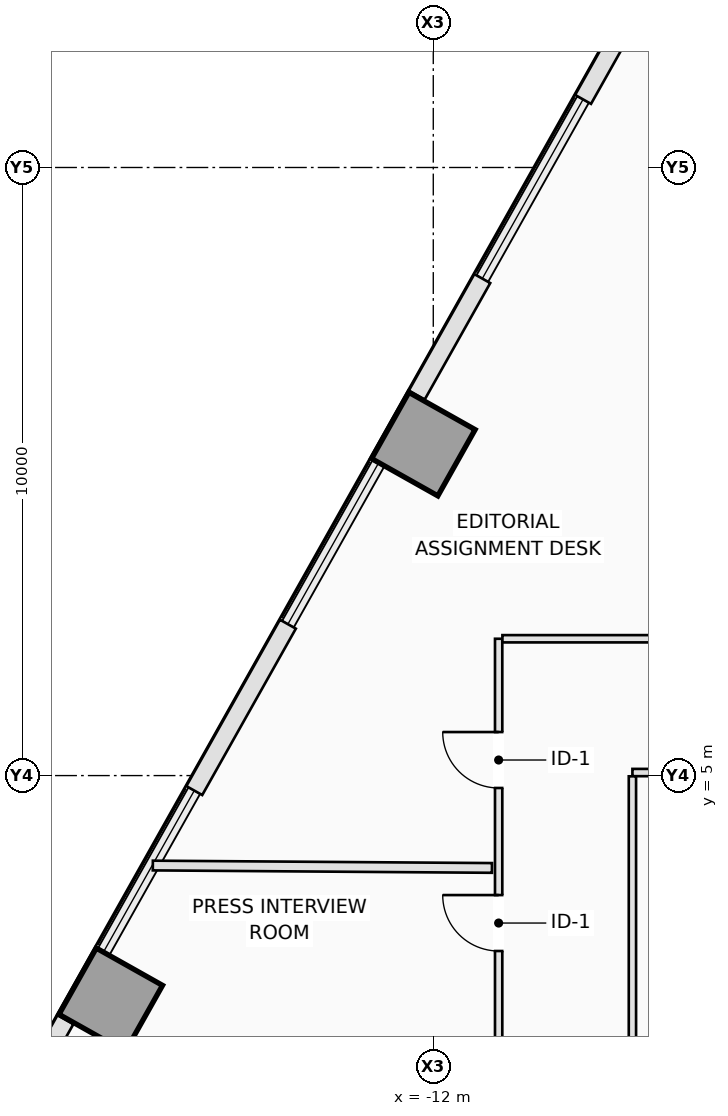
"""IFC4 building model, lengths in metres.
Left out: names, types, materials, properties, quantities, classifications, styles, units other than length and angle.
Written with IfcOpenShell. Run it as: python <this file> out.ifc"""

import sys

from ifc_helpers import new_model, si_unit, direction, frame, frame_2d, origin, origin_2d, place, context, subcontext, project, spatial, rectangle, extrude, element, fill, save


model = new_model("IFC4")
c1 = context("Model", 3, precision=1e-05, world=origin(), true_north=direction((0.0, 1.0)))
c2 = subcontext(c1, "Body", "Model", "MODEL_VIEW")
j1 = project(units=[si_unit("LENGTHUNIT", "METRE"), si_unit("PLANEANGLEUNIT", "RADIAN")], contexts=[c1])
p1 = place(None, origin())
s1 = spatial("IfcSite", under=j1, at=p1, CompositionType="ELEMENT")
p2 = place(p1, origin())
s2 = spatial("IfcBuilding", under=s1, at=p2, CompositionType="ELEMENT")
p3 = place(p2, frame((0.0, 0.0, 41.6)))
s3 = spatial("IfcBuildingStorey", under=s2, at=p3, CompositionType="ELEMENT", Elevation=41.6)
for number, where, z_axis, x_axis in (
    (1, (-12.163, 10.451, 0.0), (0.0, 0.0, 1.0), (-0.872, 0.49, 0.0)),
    (2, (-17.304, 1.312, 0.0), (0.0, 0.0, 1.0), (-0.872, 0.49, 0.0)),
):
    element("IfcColumn", number, at=place(p3, frame(where, z_axis=z_axis, x_axis=x_axis)), inside=s3, PredefinedType="COLUMN", context=c2, shape_type="SweptSolid", body=[
        extrude(rectangle(XDim=1.25, YDim=1.25, at=origin_2d()), origin(), (0.0, 0.0, 1.0), 3.5),
    ])
p4 = place(p3, frame((-19.127, -0.93, 0.0), z_axis=(0.0, 0.0, 1.0), x_axis=(0.490277063651, 0.871566635925, 0.0)))
e3 = element("IfcWall", 3, at=p4, inside=s3, PredefinedType="STANDARD", context=c2, shape_type="SweptSolid", body=[
    extrude(rectangle(XDim=2.198, YDim=0.3, at=frame_2d((1.099, 0.0))), origin(), (0.0, 0.0, 1.0), 3.25),
])
p5 = place(p3, frame((-12.271, 11.258, 0.0), z_axis=(0.0, 0.0, 1.0), x_axis=(0.490324540864, 0.871539927156, 0.0)))
e4 = element("IfcWall", 4, at=p5, inside=s3, PredefinedType="STANDARD", context=c2, shape_type="SweptSolid", body=[
    extrude(rectangle(XDim=2.197, YDim=0.3, at=frame_2d((1.099, 0.0))), origin(), (0.0, 0.0, 1.0), 3.25),
])
p6 = place(p3, frame((-9.537, 16.12, 0.0), z_axis=(0.0, 0.0, 1.0), x_axis=(0.490240735008, 0.871587070659, 0.0)))
e5 = element("IfcWall", 5, at=p6, inside=s3, PredefinedType="STANDARD", context=c2, shape_type="SweptSolid", body=[
    extrude(rectangle(XDim=3.957, YDim=0.3, at=frame_2d((1.979, 0.0))), origin(), (0.0, 0.0, 1.0), 3.25),
])
p7 = place(p3, frame((-15.93, 4.753, 0.0), z_axis=(0.0, 0.0, 1.0), x_axis=(0.490290775148, 0.871558922738, 0.0)))
e6 = element("IfcWall", 6, at=p7, inside=s3, PredefinedType="STANDARD", context=c2, shape_type="SweptSolid", body=[
    extrude(rectangle(XDim=3.14, YDim=0.3, at=frame_2d((1.57, 0.0))), origin(), (0.0, 0.0, 1.0), 3.25),
])
p8 = place(p3, frame((-10.925, -2.338, 0.0), z_axis=(0.0, 0.0, 1.0), x_axis=(0.0, 1.0, 0.0)))
e7 = element("IfcWall", 7, at=p8, inside=s3, PredefinedType="PARTITIONING", context=c2, shape_type="SweptSolid", body=[
    extrude(rectangle(XDim=9.588, YDim=0.12, at=frame_2d((4.794, 0.0))), origin(), (0.0, 0.0, 1.0), 3.25),
])
p9 = place(p8, frame((7.134, 0.0, 0.0)))
e8 = element("IfcOpeningElement", 8, at=p9, cuts=e7, PredefinedType="OPENING", context=c2, shape_type="SweptSolid", body=[
    extrude(rectangle(XDim=0.92, YDim=2.12, at=frame_2d((0.46, 1.06))), frame((0.0, 0.07, 0.0), z_axis=(0.0, -1.0, 0.0), x_axis=(1.0, 0.0, 0.0)), (0.0, 0.0, 1.0), 0.14),
])
p10 = place(p8, frame((4.453, 0.0, 0.0)))
e9 = element("IfcOpeningElement", 9, at=p10, cuts=e7, PredefinedType="OPENING", context=c2, shape_type="SweptSolid", body=[
    extrude(rectangle(XDim=0.92, YDim=2.12, at=frame_2d((0.46, 1.06))), frame((0.0, 0.07, 0.0), z_axis=(0.0, -1.0, 0.0), x_axis=(1.0, 0.0, 0.0)), (0.0, 0.0, 1.0), 0.14),
])
p11 = place(p8, frame((1.207, 0.0, 0.0)))
e10 = element("IfcOpeningElement", 10, at=p11, cuts=e7, PredefinedType="OPENING", context=c2, shape_type="SweptSolid", body=[
    extrude(rectangle(XDim=0.92, YDim=2.12, at=frame_2d((0.46, 1.06))), frame((0.0, 0.07, 0.0), z_axis=(0.0, -1.0, 0.0), x_axis=(1.0, 0.0, 0.0)), (0.0, 0.0, 1.0), 0.14),
])
p12 = place(p3, frame((-10.863, 7.25, 0.0), z_axis=(0.0, 0.0, 1.0), x_axis=(1.0, 0.0, 0.0)))
e11 = element("IfcWall", 11, at=p12, inside=s3, PredefinedType="PARTITIONING", context=c2, shape_type="SweptSolid", body=[
    extrude(rectangle(XDim=21.638, YDim=0.12, at=frame_2d((10.819, 0.0))), origin(), (0.0, 0.0, 1.0), 3.25),
])
p13 = place(p12, frame((10.653, 0.0, 0.0)))
e12 = element("IfcOpeningElement", 12, at=p13, cuts=e11, PredefinedType="OPENING", context=c2, shape_type="SweptSolid", body=[
    extrude(rectangle(XDim=0.92, YDim=2.12, at=frame_2d((0.46, 1.06))), frame((0.0, 0.07, 0.0), z_axis=(0.0, -1.0, 0.0), x_axis=(1.0, 0.0, 0.0)), (0.0, 0.0, 1.0), 0.14),
])
p14 = place(p12, frame((17.103, 0.0, 0.0)))
e13 = element("IfcOpeningElement", 13, at=p14, cuts=e11, PredefinedType="OPENING", context=c2, shape_type="SweptSolid", body=[
    extrude(rectangle(XDim=0.92, YDim=2.12, at=frame_2d((0.46, 1.06))), frame((0.0, 0.07, 0.0), z_axis=(0.0, -1.0, 0.0), x_axis=(1.0, 0.0, 0.0)), (0.0, 0.0, 1.0), 0.14),
])
p15 = place(p3, frame((8.513, 5.05, 0.0), z_axis=(0.0, 0.0, 1.0), x_axis=(-1.0, 0.0, 0.0)))
e14 = element("IfcWall", 14, at=p15, inside=s3, PredefinedType="PARTITIONING", context=c2, shape_type="SweptSolid", body=[
    extrude(rectangle(XDim=17.238, YDim=0.12, at=frame_2d((8.619, 0.0))), origin(), (0.0, 0.0, 1.0), 3.25),
])
p16 = place(p15, frame((8.128, 0.0, 0.0)))
e15 = element("IfcOpeningElement", 15, at=p16, cuts=e14, PredefinedType="OPENING", context=c2, shape_type="SweptSolid", body=[
    extrude(rectangle(XDim=0.92, YDim=2.12, at=frame_2d((0.46, 1.06))), frame((0.0, 0.07, 0.0), z_axis=(0.0, -1.0, 0.0), x_axis=(1.0, 0.0, 0.0)), (0.0, 0.0, 1.0), 0.14),
])
p17 = place(p3, frame((-8.725, 4.988, 0.0), z_axis=(0.0, 0.0, 1.0), x_axis=(0.0, -1.0, 0.0)))
e16 = element("IfcWall", 16, at=p17, inside=s3, PredefinedType="PARTITIONING", context=c2, shape_type="SweptSolid", body=[
    extrude(rectangle(XDim=7.326, YDim=0.12, at=frame_2d((3.663, 0.0))), origin(), (0.0, 0.0, 1.0), 3.25),
])
p18 = place(p3, frame((-11.035, 3.481, 0.0), z_axis=(0.0, 0.0, 1.0), x_axis=(-0.999974855712, 0.007091399344, 0.0)))
e17 = element("IfcWall", 17, at=p18, inside=s3, PredefinedType="PARTITIONING", context=c2, shape_type="SweptSolid", body=[
    extrude(rectangle(XDim=5.577, YDim=0.16, at=frame_2d((2.789, 0.0))), origin(), (0.0, 0.0, 1.0), 3.25),
])
p19 = place(p9, origin())
e18 = element("IfcDoor", 18, at=p19, inside=s3, OperationType="SINGLE_SWING_RIGHT", PredefinedType="DOOR", context=c2, shape_type="SweptSolid", body=[
    extrude(rectangle(XDim=0.92, YDim=2.12, at=frame_2d((0.46, 1.06))), frame((0.0, 0.025, 0.0), z_axis=(0.0, -1.0, 0.0), x_axis=(1.0, 0.0, 0.0)), (0.0, 0.0, 1.0), 0.05),
])
fill(e8, e18)
p20 = place(p10, origin())
e19 = element("IfcDoor", 19, at=p20, inside=s3, OperationType="SINGLE_SWING_RIGHT", PredefinedType="DOOR", context=c2, shape_type="SweptSolid", body=[
    extrude(rectangle(XDim=0.92, YDim=2.12, at=frame_2d((0.46, 1.06))), frame((0.0, 0.025, 0.0), z_axis=(0.0, -1.0, 0.0), x_axis=(1.0, 0.0, 0.0)), (0.0, 0.0, 1.0), 0.05),
])
fill(e9, e19)
save(model, sys.argv[1])
